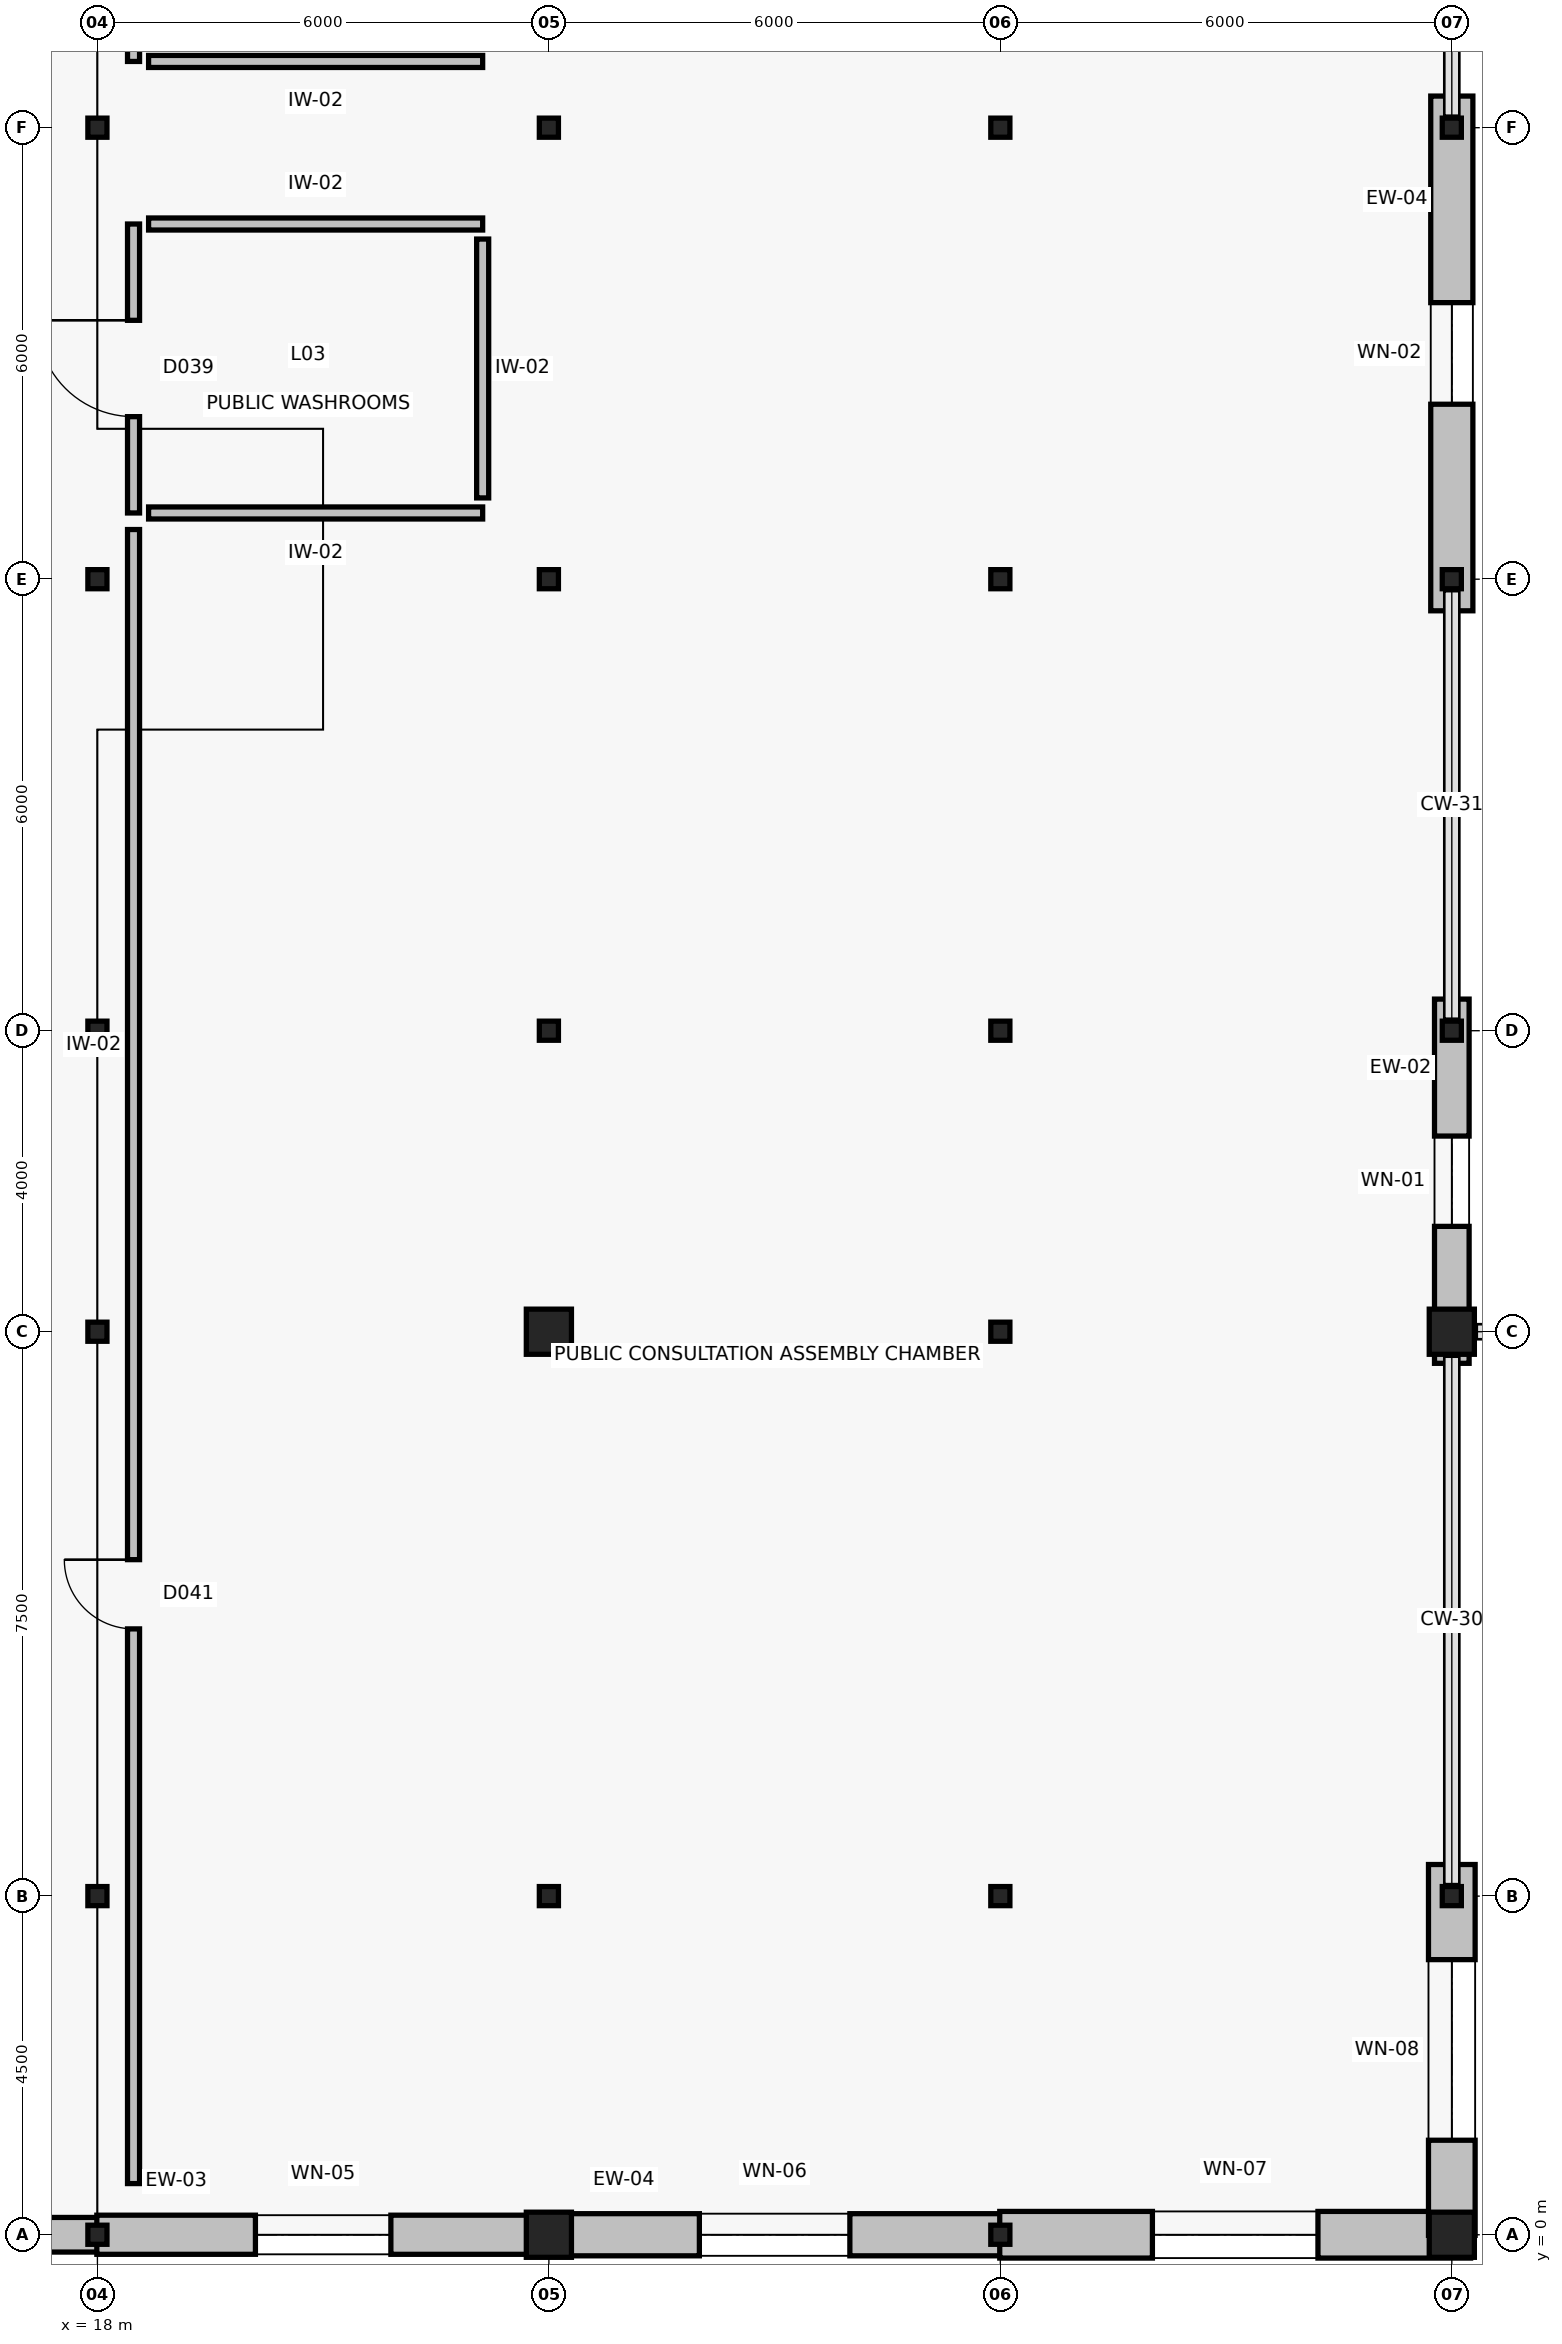
"""IFC4 building model, lengths in metres.
Left out: names, types, materials, properties, quantities, classifications, styles, units other than length and angle.
Written with IfcOpenShell. Run it as: python <this file> out.ifc"""

import sys

from ifc_helpers import new_model, si_unit, direction, frame, frame_2d, origin, origin_2d, place, context, subcontext, project, spatial, rectangle, hollow_rectangle, extrude, element, fill, save


model = new_model("IFC4")
c1 = context("Model", 3, precision=1e-05, world=origin(), true_north=direction((0.0, 1.0)))
c2 = subcontext(c1, "Body", "Model", "MODEL_VIEW")
j1 = project(units=[si_unit("LENGTHUNIT", "METRE"), si_unit("PLANEANGLEUNIT", "RADIAN")], contexts=[c1])
p1 = place(None, origin())
s1 = spatial("IfcSite", under=j1, at=p1, CompositionType="ELEMENT")
p2 = place(p1, origin())
s2 = spatial("IfcBuilding", under=s1, at=p2, CompositionType="ELEMENT")
p3 = place(p2, frame((0.0, 0.0, 11.4)))
s3 = spatial("IfcBuildingStorey", under=s2, at=p3, CompositionType="ELEMENT", Elevation=11.4)
for number, where, z_axis, x_axis in (
    (1, (18.0, 0.0, 0.0), (0.0, 0.0, 1.0), (1.0, 0.0, 0.0)),
    (2, (18.0, 4.5, 0.0), (0.0, 0.0, 1.0), (1.0, 0.0, 0.0)),
    (3, (18.0, 12.0, 0.0), (0.0, 0.0, 1.0), (1.0, 0.0, 0.0)),
    (4, (18.0, 16.0, 0.0), (0.0, 0.0, 1.0), (1.0, 0.0, 0.0)),
    (5, (18.0, 22.0, 0.0), (0.0, 0.0, 1.0), (1.0, 0.0, 0.0)),
    (6, (18.0, 28.0, 0.0), (0.0, 0.0, 1.0), (1.0, 0.0, 0.0)),
):
    element("IfcColumn", number, at=place(p3, frame(where, z_axis=z_axis, x_axis=x_axis)), inside=s3, PredefinedType="COLUMN", context=c2, shape_type="SweptSolid", body=[
        extrude(hollow_rectangle(XDim=0.254, YDim=0.254, WallThickness=0.01, InnerFilletRadius=0.01, OuterFilletRadius=0.019, at=origin_2d()), origin(), (0.0, 0.0, 1.0), 4.0),
    ])
p4 = place(p3, frame((24.0, 0.0, 0.0), z_axis=(0.0, 0.0, 1.0), x_axis=(1.0, 0.0, 0.0)))
e7 = element("IfcColumn", 7, at=p4, inside=s3, PredefinedType="COLUMN", context=c2, shape_type="SweptSolid", body=[
    extrude(rectangle(XDim=0.6, YDim=0.6, at=origin_2d()), origin(), (0.0, 0.0, 1.0), 4.0),
])
p5 = place(p3, frame((24.0, 4.5, 0.0), z_axis=(0.0, 0.0, 1.0), x_axis=(1.0, 0.0, 0.0)))
e8 = element("IfcColumn", 8, at=p5, inside=s3, PredefinedType="COLUMN", context=c2, shape_type="SweptSolid", body=[
    extrude(hollow_rectangle(XDim=0.254, YDim=0.254, WallThickness=0.01, InnerFilletRadius=0.01, OuterFilletRadius=0.019, at=origin_2d()), origin(), (0.0, 0.0, 1.0), 4.0),
])
p6 = place(p3, frame((24.0, 12.0, 0.0), z_axis=(0.0, 0.0, 1.0), x_axis=(1.0, 0.0, 0.0)))
e9 = element("IfcColumn", 9, at=p6, inside=s3, PredefinedType="COLUMN", context=c2, shape_type="SweptSolid", body=[
    extrude(rectangle(XDim=0.6, YDim=0.6, at=origin_2d()), origin(), (0.0, 0.0, 1.0), 4.0),
])
for number, where, z_axis, x_axis in (
    (10, (24.0, 16.0, 0.0), (0.0, 0.0, 1.0), (1.0, 0.0, 0.0)),
    (11, (24.0, 22.0, 0.0), (0.0, 0.0, 1.0), (1.0, 0.0, 0.0)),
    (12, (24.0, 28.0, 0.0), (0.0, 0.0, 1.0), (1.0, 0.0, 0.0)),
    (13, (30.0, 0.0, 0.0), (0.0, 0.0, 1.0), (1.0, 0.0, 0.0)),
    (14, (30.0, 4.5, 0.0), (0.0, 0.0, 1.0), (1.0, 0.0, 0.0)),
    (15, (30.0, 12.0, 0.0), (0.0, 0.0, 1.0), (1.0, 0.0, 0.0)),
    (16, (30.0, 16.0, 0.0), (0.0, 0.0, 1.0), (1.0, 0.0, 0.0)),
    (17, (30.0, 22.0, 0.0), (0.0, 0.0, 1.0), (1.0, 0.0, 0.0)),
    (18, (30.0, 28.0, 0.0), (0.0, 0.0, 1.0), (1.0, 0.0, 0.0)),
):
    element("IfcColumn", number, at=place(p3, frame(where, z_axis=z_axis, x_axis=x_axis)), inside=s3, PredefinedType="COLUMN", context=c2, shape_type="SweptSolid", body=[
        extrude(hollow_rectangle(XDim=0.254, YDim=0.254, WallThickness=0.01, InnerFilletRadius=0.01, OuterFilletRadius=0.019, at=origin_2d()), origin(), (0.0, 0.0, 1.0), 4.0),
    ])
p7 = place(p3, frame((36.0, 0.0, 0.0), z_axis=(0.0, 0.0, 1.0), x_axis=(1.0, 0.0, 0.0)))
e19 = element("IfcColumn", 19, at=p7, inside=s3, PredefinedType="COLUMN", context=c2, shape_type="SweptSolid", body=[
    extrude(rectangle(XDim=0.6, YDim=0.6, at=origin_2d()), origin(), (0.0, 0.0, 1.0), 4.0),
])
p8 = place(p3, frame((36.0, 4.5, 0.0), z_axis=(0.0, 0.0, 1.0), x_axis=(1.0, 0.0, 0.0)))
e20 = element("IfcColumn", 20, at=p8, inside=s3, PredefinedType="COLUMN", context=c2, shape_type="SweptSolid", body=[
    extrude(hollow_rectangle(XDim=0.254, YDim=0.254, WallThickness=0.01, InnerFilletRadius=0.01, OuterFilletRadius=0.019, at=origin_2d()), origin(), (0.0, 0.0, 1.0), 4.0),
])
p9 = place(p3, frame((36.0, 12.0, 0.0), z_axis=(0.0, 0.0, 1.0), x_axis=(1.0, 0.0, 0.0)))
e21 = element("IfcColumn", 21, at=p9, inside=s3, PredefinedType="COLUMN", context=c2, shape_type="SweptSolid", body=[
    extrude(rectangle(XDim=0.6, YDim=0.6, at=origin_2d()), origin(), (0.0, 0.0, 1.0), 4.0),
])
for number, where, z_axis, x_axis in (
    (22, (36.0, 16.0, 0.0), (0.0, 0.0, 1.0), (1.0, 0.0, 0.0)),
    (23, (36.0, 22.0, 0.0), (0.0, 0.0, 1.0), (1.0, 0.0, 0.0)),
    (24, (36.0, 28.0, 0.0), (0.0, 0.0, 1.0), (1.0, 0.0, 0.0)),
):
    element("IfcColumn", number, at=place(p3, frame(where, z_axis=z_axis, x_axis=x_axis)), inside=s3, PredefinedType="COLUMN", context=c2, shape_type="SweptSolid", body=[
        extrude(hollow_rectangle(XDim=0.254, YDim=0.254, WallThickness=0.01, InnerFilletRadius=0.01, OuterFilletRadius=0.019, at=origin_2d()), origin(), (0.0, 0.0, 1.0), 4.0),
    ])
p10 = place(p3, frame((11.992, 0.0, 0.0), z_axis=(0.0, 0.0, 1.0), x_axis=(1.0, 0.0, 0.0)))
e25 = element("IfcWall", 25, at=p10, inside=s3, PredefinedType="SOLIDWALL", context=c2, shape_type="SweptSolid", body=[
    extrude(rectangle(XDim=6.016, YDim=0.46, at=frame_2d((3.008, 0.0))), origin(), (0.0, 0.0, 1.0), 3.187),
])
p11 = place(p10, frame((2.183, 0.0, 0.9)))
e26 = element("IfcOpeningElement", 26, at=p11, cuts=e25, PredefinedType="OPENING", context=c2, shape_type="SweptSolid", body=[
    extrude(rectangle(XDim=1.65, YDim=1.8, at=frame_2d((0.825, 0.9))), frame((0.0, 0.245, 0.0), z_axis=(0.0, -1.0, 0.0), x_axis=(1.0, 0.0, 0.0)), (0.0, 0.0, 1.0), 0.49),
])
p12 = place(p3, frame((17.992, 0.0, 0.0), z_axis=(0.0, 0.0, 1.0), x_axis=(1.0, 0.0, 0.0)))
e27 = element("IfcWall", 27, at=p12, inside=s3, PredefinedType="SOLIDWALL", context=c2, shape_type="SweptSolid", body=[
    extrude(rectangle(XDim=6.016, YDim=0.52, at=frame_2d((3.008, 0.0))), origin(), (0.0, 0.0, 1.0), 3.187),
])
p13 = place(p12, frame((2.108, 0.0, 0.9)))
e28 = element("IfcOpeningElement", 28, at=p13, cuts=e27, PredefinedType="OPENING", context=c2, shape_type="SweptSolid", body=[
    extrude(rectangle(XDim=1.8, YDim=1.8, at=frame_2d((0.9, 0.9))), frame((0.0, 0.275, 0.0), z_axis=(0.0, -1.0, 0.0), x_axis=(1.0, 0.0, 0.0)), (0.0, 0.0, 1.0), 0.55),
])
p14 = place(p3, frame((23.992, 0.0, 0.0), z_axis=(0.0, 0.0, 1.0), x_axis=(1.0, 0.0, 0.0)))
e29 = element("IfcWall", 29, at=p14, inside=s3, PredefinedType="SOLIDWALL", context=c2, shape_type="SweptSolid", body=[
    extrude(rectangle(XDim=6.016, YDim=0.56, at=frame_2d((3.008, 0.0))), origin(), (0.0, 0.0, 1.0), 3.111),
])
p15 = place(p14, frame((2.008, 0.0, 0.9)))
e30 = element("IfcOpeningElement", 30, at=p15, cuts=e29, PredefinedType="OPENING", context=c2, shape_type="SweptSolid", body=[
    extrude(rectangle(XDim=2.0, YDim=1.8, at=frame_2d((1.0, 0.9))), frame((0.0, 0.295, 0.0), z_axis=(0.0, -1.0, 0.0), x_axis=(1.0, 0.0, 0.0)), (0.0, 0.0, 1.0), 0.59),
])
p16 = place(p3, frame((29.992, 0.0, 0.0), z_axis=(0.0, 0.0, 1.0), x_axis=(1.0, 0.0, 0.0)))
e31 = element("IfcWall", 31, at=p16, inside=s3, PredefinedType="SOLIDWALL", context=c2, shape_type="SweptSolid", body=[
    extrude(rectangle(XDim=6.258, YDim=0.62, at=frame_2d((3.129, 0.0))), origin(), (0.0, 0.0, 1.0), 3.111),
])
p17 = place(p16, frame((2.029, 0.0, 0.9)))
e32 = element("IfcOpeningElement", 32, at=p17, cuts=e31, PredefinedType="OPENING", context=c2, shape_type="SweptSolid", body=[
    extrude(rectangle(XDim=2.2, YDim=1.8, at=frame_2d((1.1, 0.9))), frame((0.0, 0.325, 0.0), z_axis=(0.0, -1.0, 0.0), x_axis=(1.0, 0.0, 0.0)), (0.0, 0.0, 1.0), 0.65),
])
p18 = place(p3, frame((36.0, -0.008, 0.0), z_axis=(0.0, 0.0, 1.0), x_axis=(0.0, 1.0, 0.0)))
e33 = element("IfcWall", 33, at=p18, inside=s3, PredefinedType="SOLIDWALL", context=c2, shape_type="SweptSolid", body=[
    extrude(rectangle(XDim=4.928, YDim=0.62, at=frame_2d((2.464, 0.0))), origin(), (0.0, 0.0, 1.0), 3.111),
])
p19 = place(p18, frame((1.264, 0.0, 0.9)))
e34 = element("IfcOpeningElement", 34, at=p19, cuts=e33, PredefinedType="OPENING", context=c2, shape_type="SweptSolid", body=[
    extrude(rectangle(XDim=2.4, YDim=1.8, at=frame_2d((1.2, 0.9))), frame((0.0, 0.325, 0.0), z_axis=(0.0, -1.0, 0.0), x_axis=(1.0, 0.0, 0.0)), (0.0, 0.0, 1.0), 0.65),
])
p20 = place(p3, frame((36.0, 11.58, 0.0), z_axis=(0.0, 0.0, 1.0), x_axis=(0.0, 1.0, 0.0)))
e35 = element("IfcWall", 35, at=p20, inside=s3, PredefinedType="SOLIDWALL", context=c2, shape_type="SweptSolid", body=[
    extrude(rectangle(XDim=4.84, YDim=0.46, at=frame_2d((2.42, 0.0))), origin(), (0.0, 0.0, 1.0), 3.187),
])
p21 = place(p20, frame((1.82, 0.0, 0.9)))
e36 = element("IfcOpeningElement", 36, at=p21, cuts=e35, PredefinedType="OPENING", context=c2, shape_type="SweptSolid", body=[
    extrude(rectangle(XDim=1.2, YDim=1.8, at=frame_2d((0.6, 0.9))), frame((0.0, 0.245, 0.0), z_axis=(0.0, -1.0, 0.0), x_axis=(1.0, 0.0, 0.0)), (0.0, 0.0, 1.0), 0.49),
])
p22 = place(p3, frame((36.0, 21.58, 0.0), z_axis=(0.0, 0.0, 1.0), x_axis=(0.0, 1.0, 0.0)))
e37 = element("IfcWall", 37, at=p22, inside=s3, PredefinedType="SOLIDWALL", context=c2, shape_type="SweptSolid", body=[
    extrude(rectangle(XDim=6.84, YDim=0.56, at=frame_2d((3.42, 0.0))), origin(), (0.0, 0.0, 1.0), 3.187),
])
p23 = place(p22, frame((2.745, 0.0, 0.9)))
e38 = element("IfcOpeningElement", 38, at=p23, cuts=e37, PredefinedType="OPENING", context=c2, shape_type="SweptSolid", body=[
    extrude(rectangle(XDim=1.35, YDim=1.8, at=frame_2d((0.675, 0.9))), frame((0.0, 0.295, 0.0), z_axis=(0.0, -1.0, 0.0), x_axis=(1.0, 0.0, 0.0)), (0.0, 0.0, 1.0), 0.59),
])
p24 = place(p3, frame((18.48, 22.88, 0.0), z_axis=(0.0, 0.0, 1.0), x_axis=(0.0, 1.0, 0.0)))
e39 = element("IfcWall", 39, at=p24, inside=s3, PredefinedType="PARTITIONING", context=c2, shape_type="SweptSolid", body=[
    extrude(rectangle(XDim=3.84, YDim=0.16, at=frame_2d((1.92, 0.0))), origin(), (0.0, 0.0, 1.0), 3.68),
])
p25 = place(p24, frame((1.28, 0.0, 0.0)))
e40 = element("IfcOpeningElement", 40, at=p25, cuts=e39, PredefinedType="OPENING", context=c2, shape_type="SweptSolid", body=[
    extrude(rectangle(XDim=1.28, YDim=2.2, at=frame_2d((0.64, 1.1))), frame((0.0, 0.095, 0.0), z_axis=(0.0, -1.0, 0.0), x_axis=(1.0, 0.0, 0.0)), (0.0, 0.0, 1.0), 0.19),
])
for number, where, z_axis, x_axis in (
    (41, (18.68, 26.72, 0.0), (0.0, 0.0, 1.0), (1.0, 0.0, 0.0)),
    (42, (23.12, 22.88, 0.0), (0.0, 0.0, 1.0), (-1.0, 0.0, 0.0)),
):
    element("IfcWall", number, at=place(p3, frame(where, z_axis=z_axis, x_axis=x_axis)), inside=s3, PredefinedType="PARTITIONING", context=c2, shape_type="SweptSolid", body=[
        extrude(rectangle(XDim=4.44, YDim=0.16, at=frame_2d((2.22, 0.0))), origin(), (0.0, 0.0, 1.0), 3.447),
    ])
p26 = place(p3, frame((23.12, 26.52, 0.0), z_axis=(0.0, 0.0, 1.0), x_axis=(0.0, -1.0, 0.0)))
e43 = element("IfcWall", 43, at=p26, inside=s3, PredefinedType="PARTITIONING", context=c2, shape_type="SweptSolid", body=[
    extrude(rectangle(XDim=3.44, YDim=0.16, at=frame_2d((1.72, 0.0))), origin(), (0.0, 0.0, 1.0), 3.68),
])
p27 = place(p3, frame((18.48, 28.88, 0.0), z_axis=(0.0, 0.0, 1.0), x_axis=(0.0, 1.0, 0.0)))
e44 = element("IfcWall", 44, at=p27, inside=s3, PredefinedType="PARTITIONING", context=c2, shape_type="SweptSolid", body=[
    extrude(rectangle(XDim=3.84, YDim=0.16, at=frame_2d((1.92, 0.0))), origin(), (0.0, 0.0, 1.0), 3.68),
])
p28 = place(p27, frame((1.24, 0.0, 0.0)))
e45 = element("IfcOpeningElement", 45, at=p28, cuts=e44, PredefinedType="OPENING", context=c2, shape_type="SweptSolid", body=[
    extrude(rectangle(XDim=1.36, YDim=2.2, at=frame_2d((0.68, 1.1))), frame((0.0, 0.095, 0.0), z_axis=(0.0, -1.0, 0.0), x_axis=(1.0, 0.0, 0.0)), (0.0, 0.0, 1.0), 0.19),
])
p29 = place(p3, frame((23.12, 28.88, 0.0), z_axis=(0.0, 0.0, 1.0), x_axis=(-1.0, 0.0, 0.0)))
e46 = element("IfcWall", 46, at=p29, inside=s3, PredefinedType="PARTITIONING", context=c2, shape_type="SweptSolid", body=[
    extrude(rectangle(XDim=4.44, YDim=0.16, at=frame_2d((2.22, 0.0))), origin(), (0.0, 0.0, 1.0), 3.403),
])
p30 = place(p3, frame((18.48, 0.68, 0.0), z_axis=(0.0, 0.0, 1.0), x_axis=(0.0, 1.0, 0.0)))
e47 = element("IfcWall", 47, at=p30, inside=s3, PredefinedType="PARTITIONING", context=c2, shape_type="SweptSolid", body=[
    extrude(rectangle(XDim=21.98, YDim=0.16, at=frame_2d((10.99, 0.0))), origin(), (0.0, 0.0, 1.0), 3.111),
])
p31 = place(p30, frame((7.371, 0.0, 0.0)))
e48 = element("IfcOpeningElement", 48, at=p31, cuts=e47, PredefinedType="OPENING", context=c2, shape_type="SweptSolid", body=[
    extrude(rectangle(XDim=0.92, YDim=2.1, at=frame_2d((0.46, 1.05))), frame((0.0, 0.095, 0.0), z_axis=(0.0, -1.0, 0.0), x_axis=(1.0, 0.0, 0.0)), (0.0, 0.0, 1.0), 0.19),
])
p32 = place(p13, origin())
e49 = element("IfcWindow", 49, at=p32, inside=s3, PartitioningType="SINGLE_PANEL", PredefinedType="WINDOW", context=c2, shape_type="SweptSolid", body=[
    extrude(rectangle(XDim=1.8, YDim=1.8, at=frame_2d((0.9, 0.9))), frame((0.0, 0.03, 0.0), z_axis=(0.0, -1.0, 0.0), x_axis=(1.0, 0.0, 0.0)), (0.0, 0.0, 1.0), 0.06),
])
fill(e28, e49)
p33 = place(p15, origin())
e50 = element("IfcWindow", 50, at=p33, inside=s3, PartitioningType="SINGLE_PANEL", PredefinedType="WINDOW", context=c2, shape_type="SweptSolid", body=[
    extrude(rectangle(XDim=2.0, YDim=1.8, at=frame_2d((1.0, 0.9))), frame((0.0, 0.03, 0.0), z_axis=(0.0, -1.0, 0.0), x_axis=(1.0, 0.0, 0.0)), (0.0, 0.0, 1.0), 0.06),
])
fill(e30, e50)
p34 = place(p17, origin())
e51 = element("IfcWindow", 51, at=p34, inside=s3, PartitioningType="SINGLE_PANEL", PredefinedType="WINDOW", context=c2, shape_type="SweptSolid", body=[
    extrude(rectangle(XDim=2.2, YDim=1.8, at=frame_2d((1.1, 0.9))), frame((0.0, 0.03, 0.0), z_axis=(0.0, -1.0, 0.0), x_axis=(1.0, 0.0, 0.0)), (0.0, 0.0, 1.0), 0.06),
])
fill(e32, e51)
p35 = place(p19, origin())
e52 = element("IfcWindow", 52, at=p35, inside=s3, PartitioningType="SINGLE_PANEL", PredefinedType="WINDOW", context=c2, shape_type="SweptSolid", body=[
    extrude(rectangle(XDim=2.4, YDim=1.8, at=frame_2d((1.2, 0.9))), frame((0.0, 0.03, 0.0), z_axis=(0.0, -1.0, 0.0), x_axis=(1.0, 0.0, 0.0)), (0.0, 0.0, 1.0), 0.06),
])
fill(e34, e52)
p36 = place(p21, origin())
e53 = element("IfcWindow", 53, at=p36, inside=s3, PartitioningType="SINGLE_PANEL", PredefinedType="WINDOW", context=c2, shape_type="SweptSolid", body=[
    extrude(rectangle(XDim=1.2, YDim=1.8, at=frame_2d((0.6, 0.9))), frame((0.0, 0.03, 0.0), z_axis=(0.0, -1.0, 0.0), x_axis=(1.0, 0.0, 0.0)), (0.0, 0.0, 1.0), 0.06),
])
fill(e36, e53)
p37 = place(p23, origin())
e54 = element("IfcWindow", 54, at=p37, inside=s3, PartitioningType="SINGLE_PANEL", PredefinedType="WINDOW", context=c2, shape_type="SweptSolid", body=[
    extrude(rectangle(XDim=1.35, YDim=1.8, at=frame_2d((0.675, 0.9))), frame((0.0, 0.03, 0.0), z_axis=(0.0, -1.0, 0.0), x_axis=(1.0, 0.0, 0.0)), (0.0, 0.0, 1.0), 0.06),
])
fill(e38, e54)
p38 = place(p25, origin())
e55 = element("IfcDoor", 55, at=p38, inside=s3, OperationType="SINGLE_SWING_RIGHT", PredefinedType="DOOR", context=c2, shape_type="SweptSolid", body=[
    extrude(rectangle(XDim=1.28, YDim=2.2, at=frame_2d((0.64, 1.1))), frame((0.0, 0.025, 0.0), z_axis=(0.0, -1.0, 0.0), x_axis=(1.0, 0.0, 0.0)), (0.0, 0.0, 1.0), 0.05),
])
fill(e40, e55)
p39 = place(p31, origin())
e56 = element("IfcDoor", 56, at=p39, inside=s3, OperationType="SINGLE_SWING_RIGHT", PredefinedType="DOOR", context=c2, shape_type="SweptSolid", body=[
    extrude(rectangle(XDim=0.92, YDim=2.1, at=frame_2d((0.46, 1.05))), frame((0.0, 0.025, 0.0), z_axis=(0.0, -1.0, 0.0), x_axis=(1.0, 0.0, 0.0)), (0.0, 0.0, 1.0), 0.05),
])
fill(e48, e56)
save(model, sys.argv[1])
